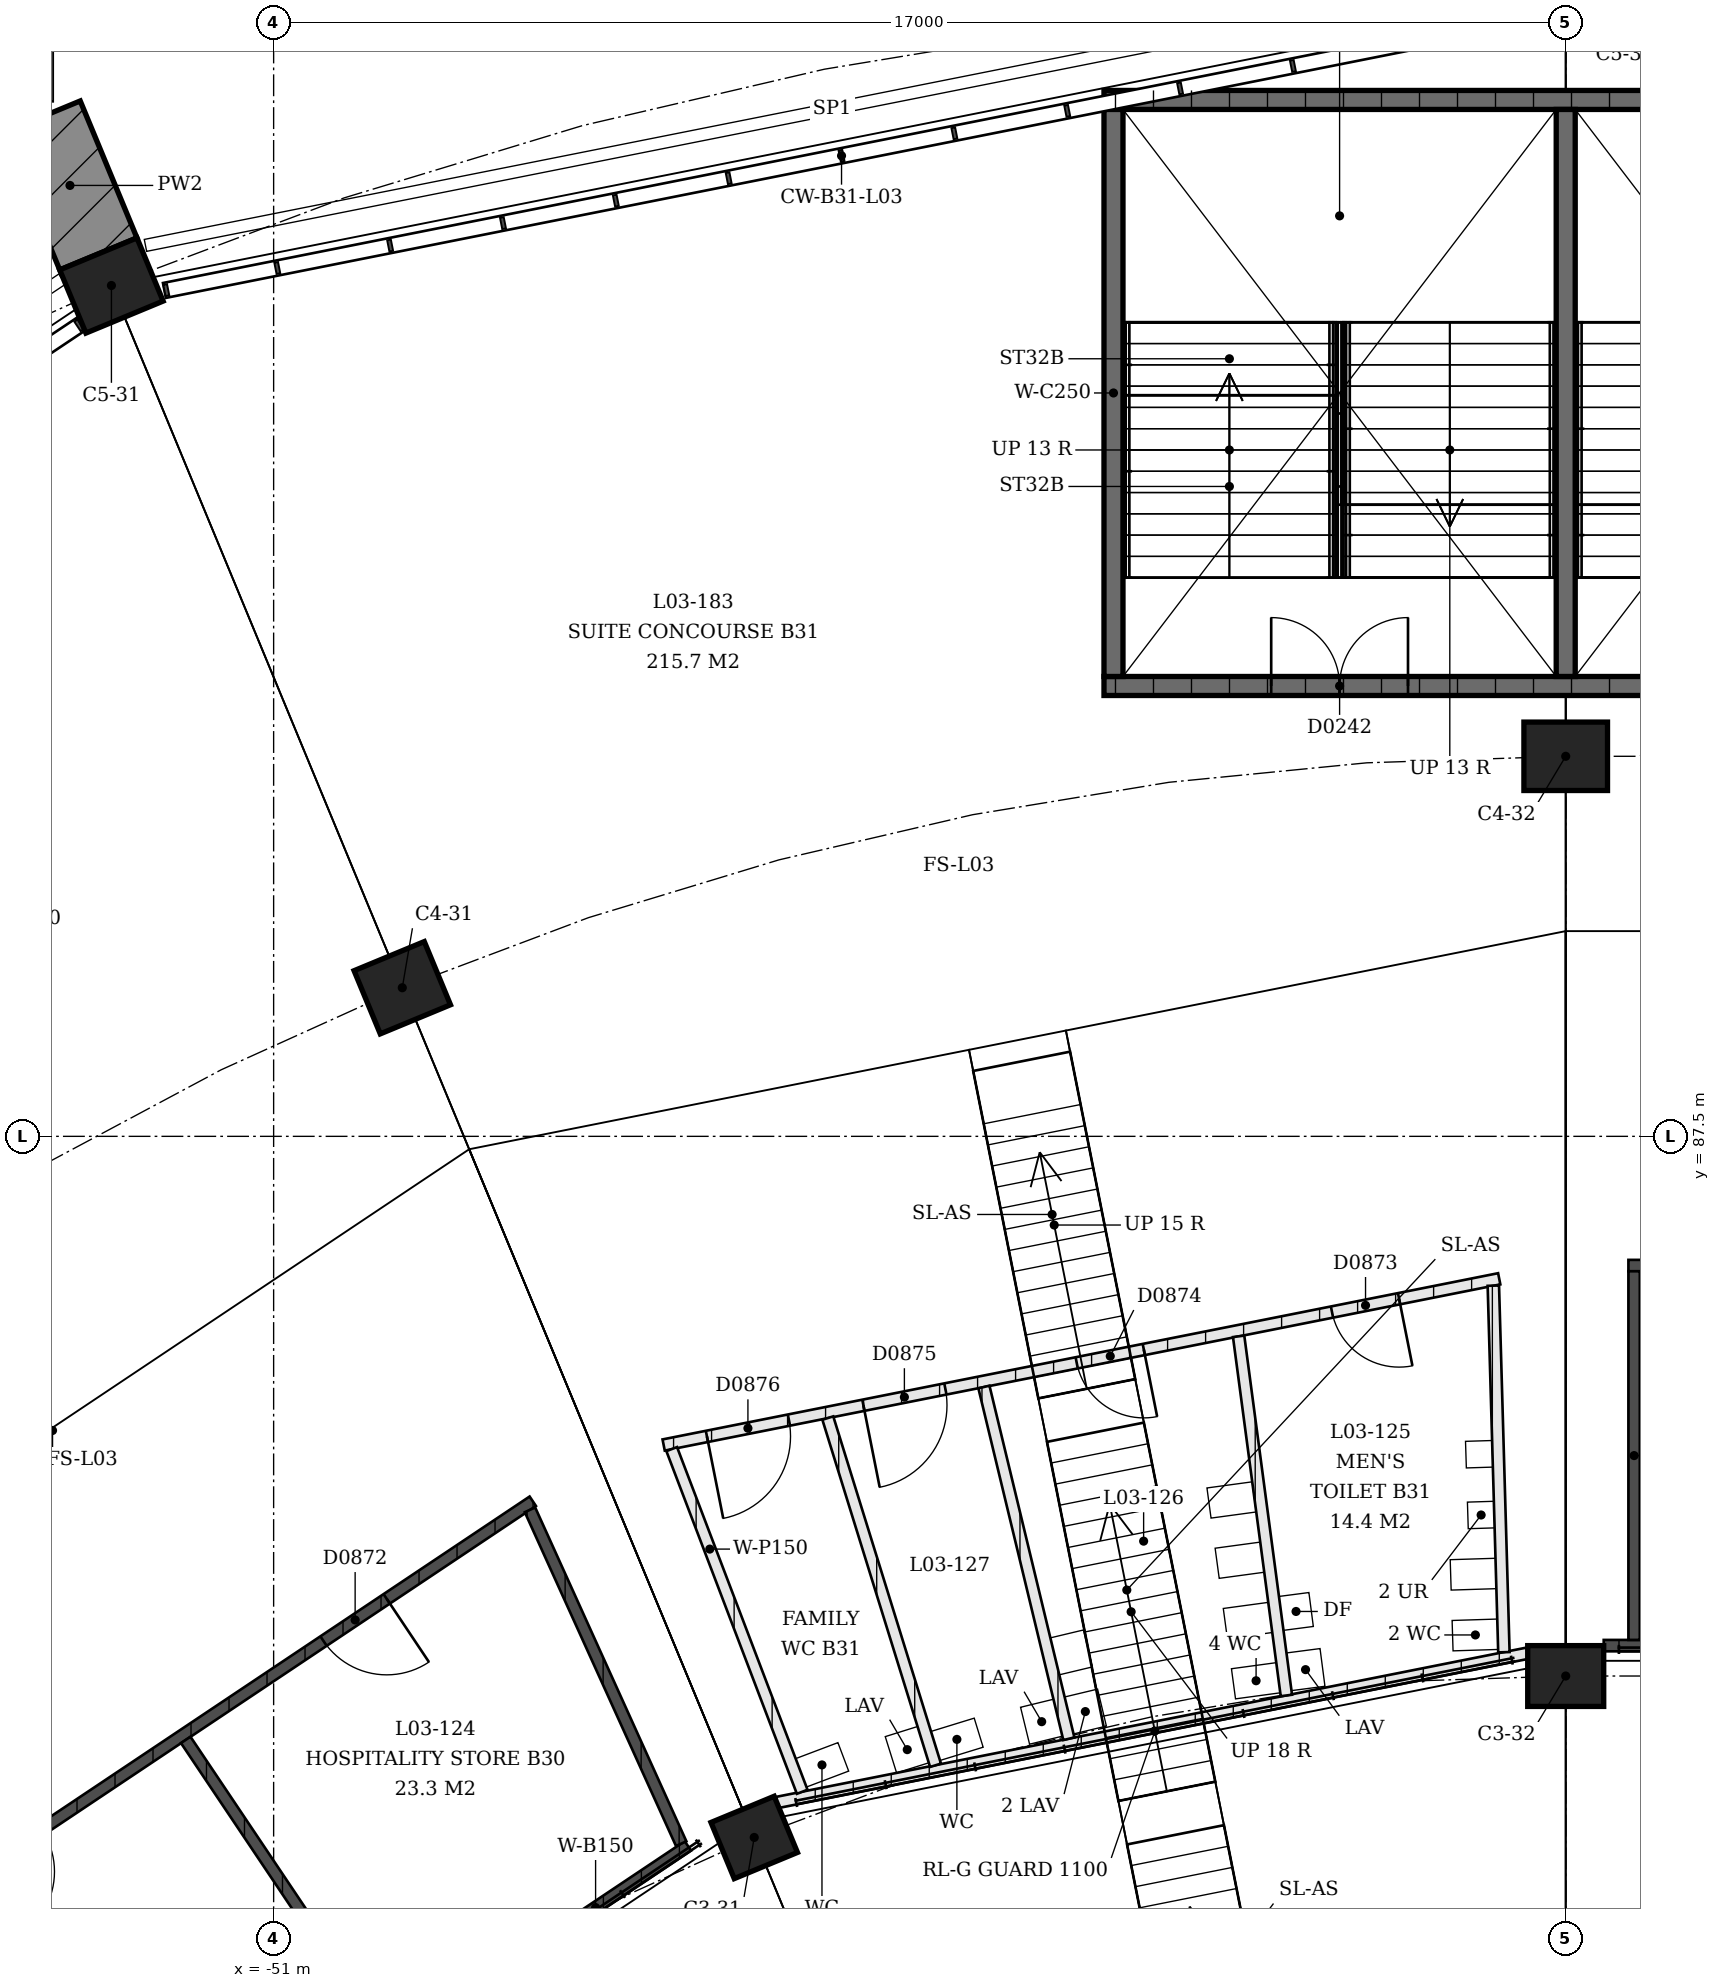
"""IFC4 building model, lengths in metres.
Left out: names, types, materials, properties, quantities, classifications, styles, units other than length and angle.
Written with IfcOpenShell. Run it as: python <this file> out.ifc"""

import sys

from ifc_helpers import new_model, si_unit, direction, frame, frame_2d, origin, origin_2d, place, context, subcontext, project, spatial, rectangle, extrude, element, fill, save


model = new_model("IFC4")
c1 = context("Model", 3, precision=1e-05, world=origin(), true_north=direction((0.0, 1.0)))
c2 = subcontext(c1, "Body", "Model", "MODEL_VIEW")
j1 = project(units=[si_unit("LENGTHUNIT", "METRE"), si_unit("PLANEANGLEUNIT", "RADIAN")], contexts=[c1])
p1 = place(None, origin())
s1 = spatial("IfcSite", under=j1, at=p1, CompositionType="ELEMENT")
p2 = place(p1, origin())
s2 = spatial("IfcBuilding", under=s1, at=p2, CompositionType="ELEMENT")
p3 = place(p2, frame((0.0, 0.0, 13.5)))
s3 = spatial("IfcBuildingStorey", under=s2, at=p3, CompositionType="ELEMENT", Elevation=13.5)
p4 = place(p3, frame((-44.677, 78.276, 0.0), z_axis=(0.0, 0.0, 1.0), x_axis=(-0.923879532511, -0.382683432365, 0.0)))
e1 = element("IfcColumn", 1, at=p4, inside=s3, PredefinedType="COLUMN", context=c2, shape_type="SweptSolid", body=[
    extrude(rectangle(XDim=0.9, YDim=0.8, at=origin_2d()), origin(), (0.0, 0.0, 1.0), 2.033),
])
p5 = place(p3, frame((-49.307, 89.455, 0.0), z_axis=(0.0, 0.0, 1.0), x_axis=(-0.923879532511, -0.382683432365, 0.0)))
e2 = element("IfcColumn", 2, at=p5, inside=s3, PredefinedType="COLUMN", context=c2, shape_type="SweptSolid", body=[
    extrude(rectangle(XDim=1.0, YDim=0.9, at=origin_2d()), origin(), (0.0, 0.0, 1.0), 4.5),
])
p6 = place(p3, frame((-53.134, 98.694, 0.0), z_axis=(0.0, 0.0, 1.0), x_axis=(-0.923879532511, -0.382683432365, 0.0)))
e3 = element("IfcColumn", 3, at=p6, inside=s3, PredefinedType="COLUMN", context=c2, shape_type="SweptSolid", body=[
    extrude(rectangle(XDim=1.1, YDim=0.9, at=origin_2d()), origin(), (0.0, 0.0, 1.0), 4.5),
])
p7 = place(p3, frame((-34.0, 80.4, 0.0), z_axis=(0.0, 0.0, 1.0), x_axis=(-1.0, 0.0, 0.0)))
e4 = element("IfcColumn", 4, at=p7, inside=s3, PredefinedType="COLUMN", context=c2, shape_type="SweptSolid", body=[
    extrude(rectangle(XDim=1.0, YDim=0.8, at=origin_2d()), origin(), (0.0, 0.0, 1.0), 2.033),
])
p8 = place(p3, frame((-34.0, 92.5, 0.0), z_axis=(0.0, 0.0, 1.0), x_axis=(-1.0, 0.0, 0.0)))
e5 = element("IfcColumn", 5, at=p8, inside=s3, PredefinedType="COLUMN", context=c2, shape_type="SweptSolid", body=[
    extrude(rectangle(XDim=1.1, YDim=0.9, at=origin_2d()), origin(), (0.0, 0.0, 1.0), 4.5),
])
p9 = place(p3, frame((-27.925, 93.425, 0.0), z_axis=(0.0, 0.0, 1.0), x_axis=(-1.0, 0.0, 0.0)))
e6 = element("IfcWall", 6, at=p9, inside=s3, PredefinedType="SHEAR", context=c2, shape_type="SweptSolid", body=[
    extrude(rectangle(XDim=12.15, YDim=0.25, at=frame_2d((6.075, 0.0))), origin(), (0.0, 0.0, 1.0), 4.09),
])
p10 = place(p9, frame((2.2, 0.0, 0.0)))
e7 = element("IfcOpeningElement", 7, at=p10, cuts=e6, PredefinedType="OPENING", context=c2, shape_type="SweptSolid", body=[
    extrude(rectangle(XDim=1.8, YDim=2.1, at=frame_2d((0.9, 1.05))), frame((0.0, 0.125, 0.0), z_axis=(0.0, -1.0, 0.0), x_axis=(1.0, 0.0, 0.0)), (0.0, 0.0, 1.0), 0.25),
])
p11 = place(p9, frame((8.15, 0.0, 0.0)))
e8 = element("IfcOpeningElement", 8, at=p11, cuts=e6, PredefinedType="OPENING", context=c2, shape_type="SweptSolid", body=[
    extrude(rectangle(XDim=1.8, YDim=2.1, at=frame_2d((0.9, 1.05))), frame((0.0, 0.125, 0.0), z_axis=(0.0, -1.0, 0.0), x_axis=(1.0, 0.0, 0.0)), (0.0, 0.0, 1.0), 0.25),
])
p12 = place(p3, frame((-27.925, 101.135, 0.0), z_axis=(0.0, 0.0, 1.0), x_axis=(-1.0, 0.0, 0.0)))
e9 = element("IfcWall", 9, at=p12, inside=s3, PredefinedType="SHEAR", context=c2, shape_type="SweptSolid", body=[
    extrude(rectangle(XDim=12.15, YDim=0.25, at=frame_2d((6.075, 0.0))), origin(), (0.0, 0.0, 1.0), 4.09),
])
for number, where, z_axis, x_axis in (
    (10, (-39.95, 93.55, 0.0), (0.0, 0.0, 1.0), (0.0, 1.0, 0.0)),
    (11, (-34.0, 93.55, 0.0), (0.0, 0.0, 1.0), (0.0, 1.0, 0.0)),
):
    element("IfcWall", number, at=place(p3, frame(where, z_axis=z_axis, x_axis=x_axis)), inside=s3, PredefinedType="SHEAR", context=c2, shape_type="SweptSolid", body=[
        extrude(rectangle(XDim=7.46, YDim=0.25, at=frame_2d((3.73, 0.0))), origin(), (0.0, 0.0, 1.0), 4.09),
    ])
p13 = place(p3, frame((-53.63, 72.766, 0.0), z_axis=(0.0, 0.0, 1.0), x_axis=(0.831481684117, 0.555552165847, 0.0)))
e12 = element("IfcWall", 12, at=p13, inside=s3, PredefinedType="SOLIDWALL", context=c2, shape_type="SweptSolid", body=[
    extrude(rectangle(XDim=9.718, YDim=0.15, at=frame_2d((4.859, 0.0))), origin(), (0.0, 0.0, 1.0), 3.0),
])
p14 = place(p3, frame((-56.805, 76.542, 0.0), z_axis=(0.0, 0.0, 1.0), x_axis=(0.831470287315, 0.555569222791, 0.0)))
e13 = element("IfcWall", 13, at=p14, inside=s3, PredefinedType="SOLIDWALL", context=c2, shape_type="SweptSolid", body=[
    extrude(rectangle(XDim=11.082, YDim=0.15, at=frame_2d((5.541, 0.0))), origin(), (0.0, 0.0, 1.0), 3.0),
])
p15 = place(p14, frame((2.311, 0.0, 0.0)))
e14 = element("IfcOpeningElement", 14, at=p15, cuts=e13, PredefinedType="OPENING", context=c2, shape_type="SweptSolid", body=[
    extrude(rectangle(XDim=1.0, YDim=2.1, at=frame_2d((0.5, 1.05))), frame((0.0, 0.075, 0.0), z_axis=(0.0, -1.0, 0.0), x_axis=(1.0, 0.0, 0.0)), (0.0, 0.0, 1.0), 0.15),
])
p16 = place(p14, frame((7.771, 0.0, 0.0)))
e15 = element("IfcOpeningElement", 15, at=p16, cuts=e13, PredefinedType="OPENING", context=c2, shape_type="SweptSolid", body=[
    extrude(rectangle(XDim=1.0, YDim=2.1, at=frame_2d((0.5, 1.05))), frame((0.0, 0.075, 0.0), z_axis=(0.0, -1.0, 0.0), x_axis=(1.0, 0.0, 0.0)), (0.0, 0.0, 1.0), 0.15),
])
p17 = place(p3, frame((-49.506, 75.61, 0.0), z_axis=(0.0, 0.0, 1.0), x_axis=(-0.557185009832, 0.830388381915, 0.0)))
e16 = element("IfcWall", 16, at=p17, inside=s3, PredefinedType="SOLIDWALL", context=c2, shape_type="SweptSolid", body=[
    extrude(rectangle(XDim=4.757, YDim=0.15, at=frame_2d((2.378, 0.0))), origin(), (0.0, 0.0, 1.0), 3.0),
])
p18 = place(p3, frame((-45.638, 78.195, 0.0), z_axis=(0.0, 0.0, 1.0), x_axis=(-0.412593178732, 0.910915401596, 0.0)))
e17 = element("IfcWall", 17, at=p18, inside=s3, PredefinedType="SOLIDWALL", context=c2, shape_type="SweptSolid", body=[
    extrude(rectangle(XDim=4.821, YDim=0.15, at=frame_2d((2.411, 0.0))), origin(), (0.0, 0.0, 1.0), 3.0),
])
p19 = place(p3, frame((-34.5, 80.7, 0.0), z_axis=(0.0, 0.0, 1.0), x_axis=(-0.980787996346, -0.195076667554, 0.0)))
e18 = element("IfcWall", 18, at=p19, inside=s3, PredefinedType="PARTITIONING", context=c2, shape_type="SweptSolid", body=[
    extrude(rectangle(XDim=10.073, YDim=0.15, at=frame_2d((5.037, 0.0))), origin(), (0.0, 0.0, 1.0), 3.0),
])
p20 = place(p3, frame((-34.875, 85.626, 0.0), z_axis=(0.0, 0.0, 1.0), x_axis=(-0.980786208969, -0.195085653744, 0.0)))
e19 = element("IfcWall", 19, at=p20, inside=s3, PredefinedType="PARTITIONING", context=c2, shape_type="SweptSolid", body=[
    extrude(rectangle(XDim=11.209, YDim=0.15, at=frame_2d((5.604, 0.0))), origin(), (0.0, 0.0, 1.0), 3.0),
])
p21 = place(p20, frame((1.343, 0.0, 0.0)))
e20 = element("IfcOpeningElement", 20, at=p21, cuts=e19, PredefinedType="OPENING", context=c2, shape_type="SweptSolid", body=[
    extrude(rectangle(XDim=0.9, YDim=2.1, at=frame_2d((0.45, 1.05))), frame((0.0, 0.075, 0.0), z_axis=(0.0, -1.0, 0.0), x_axis=(1.0, 0.0, 0.0)), (0.0, 0.0, 1.0), 0.15),
])
p22 = place(p20, frame((4.768, 0.0, 0.0)))
e21 = element("IfcOpeningElement", 21, at=p22, cuts=e19, PredefinedType="OPENING", context=c2, shape_type="SweptSolid", body=[
    extrude(rectangle(XDim=0.9, YDim=2.1, at=frame_2d((0.45, 1.05))), frame((0.0, 0.075, 0.0), z_axis=(0.0, -1.0, 0.0), x_axis=(1.0, 0.0, 0.0)), (0.0, 0.0, 1.0), 0.15),
])
p23 = place(p20, frame((7.43, 0.0, 0.0)))
e22 = element("IfcOpeningElement", 22, at=p23, cuts=e19, PredefinedType="OPENING", context=c2, shape_type="SweptSolid", body=[
    extrude(rectangle(XDim=1.1, YDim=2.1, at=frame_2d((0.55, 1.05))), frame((0.0, 0.075, 0.0), z_axis=(0.0, -1.0, 0.0), x_axis=(1.0, 0.0, 0.0)), (0.0, 0.0, 1.0), 0.15),
])
p24 = place(p20, frame((9.529, 0.0, 0.0)))
e23 = element("IfcOpeningElement", 23, at=p24, cuts=e19, PredefinedType="OPENING", context=c2, shape_type="SweptSolid", body=[
    extrude(rectangle(XDim=1.1, YDim=2.1, at=frame_2d((0.55, 1.05))), frame((0.0, 0.075, 0.0), z_axis=(0.0, -1.0, 0.0), x_axis=(1.0, 0.0, 0.0)), (0.0, 0.0, 1.0), 0.15),
])
p25 = place(p3, frame((-34.813, 80.713, 0.0), z_axis=(0.0, 0.0, 1.0), x_axis=(-0.028793807365, 0.999585372371, 0.0)))
e24 = element("IfcWall", 24, at=p25, inside=s3, PredefinedType="PARTITIONING", context=c2, shape_type="SweptSolid", body=[
    extrude(rectangle(XDim=4.824, YDim=0.15, at=frame_2d((2.412, 0.0))), origin(), (0.0, 0.0, 1.0), 3.0),
])
p26 = place(p3, frame((-37.675, 80.144, 0.0), z_axis=(0.0, 0.0, 1.0), x_axis=(-0.131791297018, 0.991277485889, 0.0)))
e25 = element("IfcWall", 25, at=p26, inside=s3, PredefinedType="PARTITIONING", context=c2, shape_type="SweptSolid", body=[
    extrude(rectangle(XDim=4.766, YDim=0.15, at=frame_2d((2.383, 0.0))), origin(), (0.0, 0.0, 1.0), 3.0),
])
p27 = place(p3, frame((-40.537, 79.575, 0.0), z_axis=(0.0, 0.0, 1.0), x_axis=(-0.234720740692, 0.972062844619, 0.0)))
e26 = element("IfcWall", 26, at=p27, inside=s3, PredefinedType="PARTITIONING", context=c2, shape_type="SweptSolid", body=[
    extrude(rectangle(XDim=4.761, YDim=0.15, at=frame_2d((2.38, 0.0))), origin(), (0.0, 0.0, 1.0), 3.0),
])
p28 = place(p3, frame((-42.291, 79.226, 0.0), z_axis=(0.0, 0.0, 1.0), x_axis=(-0.296312515745, 0.955091039123, 0.0)))
e27 = element("IfcWall", 27, at=p28, inside=s3, PredefinedType="PARTITIONING", context=c2, shape_type="SweptSolid", body=[
    extrude(rectangle(XDim=4.783, YDim=0.15, at=frame_2d((2.392, 0.0))), origin(), (0.0, 0.0, 1.0), 3.0),
])
p29 = place(p3, frame((-44.045, 78.877, 0.0), z_axis=(0.0, 0.0, 1.0), x_axis=(-0.355921670207, 0.934515791561, 0.0)))
e28 = element("IfcWall", 28, at=p29, inside=s3, PredefinedType="PARTITIONING", context=c2, shape_type="SweptSolid", body=[
    extrude(rectangle(XDim=4.824, YDim=0.15, at=frame_2d((2.412, 0.0))), origin(), (0.0, 0.0, 1.0), 3.0),
])
p30 = place(p3, frame((-33.5, 80.8, 0.0), z_axis=(0.0, 0.0, 1.0), x_axis=(1.0, 0.0, 0.0)))
e29 = element("IfcWall", 29, at=p30, inside=s3, PredefinedType="SOLIDWALL", context=c2, shape_type="SweptSolid", body=[
    extrude(rectangle(XDim=12.275, YDim=0.15, at=frame_2d((6.137, 0.0))), origin(), (0.0, 0.0, 1.0), 3.0),
])
p31 = place(p3, frame((-33.175, 85.8, 0.0), z_axis=(0.0, 0.0, 1.0), x_axis=(1.0, 0.0, 0.0)))
e30 = element("IfcWall", 30, at=p31, inside=s3, PredefinedType="SOLIDWALL", context=c2, shape_type="SweptSolid", body=[
    extrude(rectangle(XDim=11.95, YDim=0.15, at=frame_2d((5.975, 0.0))), origin(), (0.0, 0.0, 1.0), 3.0),
])
p32 = place(p31, frame((2.525, 0.0, 0.0)))
e31 = element("IfcOpeningElement", 31, at=p32, cuts=e30, PredefinedType="OPENING", context=c2, shape_type="SweptSolid", body=[
    extrude(rectangle(XDim=1.0, YDim=2.1, at=frame_2d((0.5, 1.05))), frame((0.0, 0.075, 0.0), z_axis=(0.0, -1.0, 0.0), x_axis=(1.0, 0.0, 0.0)), (0.0, 0.0, 1.0), 0.15),
])
p33 = place(p31, frame((8.425, 0.0, 0.0)))
e32 = element("IfcOpeningElement", 32, at=p33, cuts=e30, PredefinedType="OPENING", context=c2, shape_type="SweptSolid", body=[
    extrude(rectangle(XDim=1.0, YDim=2.1, at=frame_2d((0.5, 1.05))), frame((0.0, 0.075, 0.0), z_axis=(0.0, -1.0, 0.0), x_axis=(1.0, 0.0, 0.0)), (0.0, 0.0, 1.0), 0.15),
])
p34 = place(p3, frame((-33.1, 80.875, 0.0), z_axis=(0.0, 0.0, 1.0), x_axis=(0.0, 1.0, 0.0)))
e33 = element("IfcWall", 33, at=p34, inside=s3, PredefinedType="SOLIDWALL", context=c2, shape_type="SweptSolid", body=[
    extrude(rectangle(XDim=4.85, YDim=0.15, at=frame_2d((2.425, 0.0))), origin(), (0.0, 0.0, 1.0), 3.0),
])
p35 = place(p11, origin())
e34 = element("IfcDoor", 34, at=p35, inside=s3, OperationType="DOUBLE_DOOR_SINGLE_SWING", PredefinedType="DOOR", context=c2, shape_type="SweptSolid", body=[
    extrude(rectangle(XDim=1.8, YDim=2.1, at=frame_2d((0.9, 1.05))), frame((0.0, 0.025, 0.0), z_axis=(0.0, -1.0, 0.0), x_axis=(1.0, 0.0, 0.0)), (0.0, 0.0, 1.0), 0.05),
])
fill(e8, e34)
p36 = place(p16, origin())
e35 = element("IfcDoor", 35, at=p36, inside=s3, OperationType="SINGLE_SWING_RIGHT", PredefinedType="DOOR", context=c2, shape_type="SweptSolid", body=[
    extrude(rectangle(XDim=1.0, YDim=2.1, at=frame_2d((0.5, 1.05))), frame((0.0, 0.025, 0.0), z_axis=(0.0, -1.0, 0.0), x_axis=(1.0, 0.0, 0.0)), (0.0, 0.0, 1.0), 0.05),
])
fill(e15, e35)
p37 = place(p21, origin())
e36 = element("IfcDoor", 36, at=p37, inside=s3, OperationType="SINGLE_SWING_RIGHT", PredefinedType="DOOR", context=c2, shape_type="SweptSolid", body=[
    extrude(rectangle(XDim=0.9, YDim=2.1, at=frame_2d((0.45, 1.05))), frame((0.0, 0.025, 0.0), z_axis=(0.0, -1.0, 0.0), x_axis=(1.0, 0.0, 0.0)), (0.0, 0.0, 1.0), 0.05),
])
fill(e20, e36)
p38 = place(p22, origin())
e37 = element("IfcDoor", 37, at=p38, inside=s3, OperationType="SINGLE_SWING_RIGHT", PredefinedType="DOOR", context=c2, shape_type="SweptSolid", body=[
    extrude(rectangle(XDim=0.9, YDim=2.1, at=frame_2d((0.45, 1.05))), frame((0.0, 0.025, 0.0), z_axis=(0.0, -1.0, 0.0), x_axis=(1.0, 0.0, 0.0)), (0.0, 0.0, 1.0), 0.05),
])
fill(e21, e37)
p39 = place(p23, origin())
e38 = element("IfcDoor", 38, at=p39, inside=s3, OperationType="SINGLE_SWING_LEFT", PredefinedType="DOOR", context=c2, shape_type="SweptSolid", body=[
    extrude(rectangle(XDim=1.1, YDim=2.1, at=frame_2d((0.55, 1.05))), frame((0.0, 0.025, 0.0), z_axis=(0.0, -1.0, 0.0), x_axis=(1.0, 0.0, 0.0)), (0.0, 0.0, 1.0), 0.05),
])
fill(e22, e38)
p40 = place(p24, origin())
e39 = element("IfcDoor", 39, at=p40, inside=s3, OperationType="SINGLE_SWING_LEFT", PredefinedType="DOOR", context=c2, shape_type="SweptSolid", body=[
    extrude(rectangle(XDim=1.1, YDim=2.1, at=frame_2d((0.55, 1.05))), frame((0.0, 0.025, 0.0), z_axis=(0.0, -1.0, 0.0), x_axis=(1.0, 0.0, 0.0)), (0.0, 0.0, 1.0), 0.05),
])
fill(e23, e39)
save(model, sys.argv[1])
